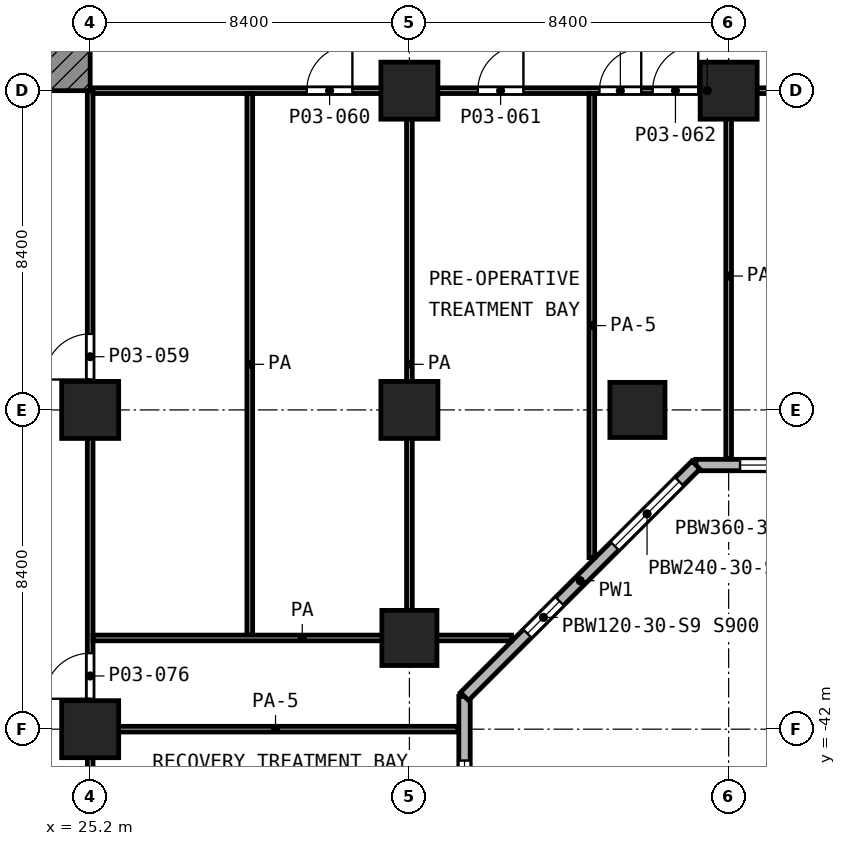
"""IFC4 building model, lengths in metres.
Left out: names, types, materials, properties, quantities, classifications, styles, units other than length and angle.
Written with IfcOpenShell. Run it as: python <this file> out.ifc"""

import sys

from ifc_helpers import new_model, si_unit, direction, frame, frame_2d, origin, origin_2d, place, context, subcontext, project, spatial, rectangle, extrude, element, fill, save


model = new_model("IFC4")
c1 = context("Model", 3, precision=1e-05, world=origin(), true_north=direction((0.0, 1.0)))
c2 = subcontext(c1, "Body", "Model", "MODEL_VIEW")
j1 = project(units=[si_unit("LENGTHUNIT", "METRE"), si_unit("PLANEANGLEUNIT", "RADIAN")], contexts=[c1])
p1 = place(None, origin())
s1 = spatial("IfcSite", under=j1, at=p1, CompositionType="ELEMENT")
p2 = place(p1, origin())
s2 = spatial("IfcBuilding", under=s1, at=p2, CompositionType="ELEMENT")
p3 = place(p2, frame((0.0, 0.0, 12.6)))
s3 = spatial("IfcBuildingStorey", under=s2, at=p3, CompositionType="ELEMENT", Elevation=12.6)
for number, where, z_axis, x_axis in (
    (1, (33.6, -25.2, 0.0), (0.0, 0.0, 1.0), (1.0, 0.0, 0.0)),
    (2, (42.0, -25.2, 0.0), (0.0, 0.0, 1.0), (1.0, 0.0, 0.0)),
    (3, (25.2, -33.6, 0.0), (0.0, 0.0, 1.0), (1.0, 0.0, 0.0)),
    (4, (33.6, -33.6, 0.0), (0.0, 0.0, 1.0), (1.0, 0.0, 0.0)),
):
    element("IfcColumn", number, at=place(p3, frame(where, z_axis=z_axis, x_axis=x_axis)), inside=s3, PredefinedType="COLUMN", context=c2, shape_type="SweptSolid", body=[
        extrude(rectangle(XDim=1.5, YDim=1.5, at=origin_2d()), origin(), (0.0, 0.0, 1.0), 5.6),
    ])
for number, where, z_axis, x_axis in (
    (5, (39.6, -33.6, 0.0), (0.0, 0.0, 1.0), (1.0, 0.0, 0.0)),
    (6, (33.6, -39.6, 0.0), (0.0, 0.0, 1.0), (1.0, 0.0, 0.0)),
):
    element("IfcColumn", number, at=place(p3, frame(where, z_axis=z_axis, x_axis=x_axis)), inside=s3, PredefinedType="COLUMN", context=c2, shape_type="SweptSolid", body=[
        extrude(rectangle(XDim=1.45, YDim=1.45, at=origin_2d()), origin(), (0.0, 0.0, 1.0), 5.6),
    ])
p4 = place(p3, frame((25.2, -42.0, 0.0), z_axis=(0.0, 0.0, 1.0), x_axis=(1.0, 0.0, 0.0)))
e7 = element("IfcColumn", 7, at=p4, inside=s3, PredefinedType="COLUMN", context=c2, shape_type="SweptSolid", body=[
    extrude(rectangle(XDim=1.5, YDim=1.5, at=origin_2d()), origin(), (0.0, 0.0, 1.0), 5.6),
])
p5 = place(p3, frame((35.05, -79.538, 0.0), z_axis=(0.0, 0.0, 1.0), x_axis=(0.0, 1.0, 0.0)))
e8 = element("IfcWall", 8, at=p5, inside=s3, PredefinedType="SOLIDWALL", context=c2, shape_type="SweptSolid", body=[
    extrude(rectangle(XDim=38.4, YDim=0.3, at=frame_2d((19.2, 0.0))), origin(), (0.0, 0.0, 1.0), 5.25),
])
p6 = place(p5, frame((0.738, 0.0, 0.9)))
e9 = element("IfcOpeningElement", 9, at=p6, cuts=e8, PredefinedType="OPENING", context=c2, shape_type="SweptSolid", body=[
    extrude(rectangle(XDim=2.4, YDim=3.0, at=frame_2d((1.2, 1.5))), frame((0.0, 0.16, 0.0), z_axis=(0.0, -1.0, 0.0), x_axis=(1.0, 0.0, 0.0)), (0.0, 0.0, 1.0), 0.32),
])
p7 = place(p5, frame((4.238, 0.0, 0.9)))
e10 = element("IfcOpeningElement", 10, at=p7, cuts=e8, PredefinedType="OPENING", context=c2, shape_type="SweptSolid", body=[
    extrude(rectangle(XDim=3.6, YDim=3.0, at=frame_2d((1.8, 1.5))), frame((0.0, 0.16, 0.0), z_axis=(0.0, -1.0, 0.0), x_axis=(1.0, 0.0, 0.0)), (0.0, 0.0, 1.0), 0.32),
])
p8 = place(p5, frame((8.438, 0.0, 0.9)))
e11 = element("IfcOpeningElement", 11, at=p8, cuts=e8, PredefinedType="OPENING", context=c2, shape_type="SweptSolid", body=[
    extrude(rectangle(XDim=3.6, YDim=3.0, at=frame_2d((1.8, 1.5))), frame((0.0, 0.16, 0.0), z_axis=(0.0, -1.0, 0.0), x_axis=(1.0, 0.0, 0.0)), (0.0, 0.0, 1.0), 0.32),
])
p9 = place(p5, frame((12.638, 0.0, 0.9)))
e12 = element("IfcOpeningElement", 12, at=p9, cuts=e8, PredefinedType="OPENING", context=c2, shape_type="SweptSolid", body=[
    extrude(rectangle(XDim=3.6, YDim=3.0, at=frame_2d((1.8, 1.5))), frame((0.0, 0.16, 0.0), z_axis=(0.0, -1.0, 0.0), x_axis=(1.0, 0.0, 0.0)), (0.0, 0.0, 1.0), 0.32),
])
p10 = place(p5, frame((17.663, 0.0, 0.9)))
e13 = element("IfcOpeningElement", 13, at=p10, cuts=e8, PredefinedType="OPENING", context=c2, shape_type="SweptSolid", body=[
    extrude(rectangle(XDim=2.4, YDim=3.0, at=frame_2d((1.2, 1.5))), frame((0.0, 0.16, 0.0), z_axis=(0.0, -1.0, 0.0), x_axis=(1.0, 0.0, 0.0)), (0.0, 0.0, 1.0), 0.32),
])
p11 = place(p5, frame((21.563, 0.0, 0.9)))
e14 = element("IfcOpeningElement", 14, at=p11, cuts=e8, PredefinedType="OPENING", context=c2, shape_type="SweptSolid", body=[
    extrude(rectangle(XDim=2.4, YDim=3.0, at=frame_2d((1.2, 1.5))), frame((0.0, 0.16, 0.0), z_axis=(0.0, -1.0, 0.0), x_axis=(1.0, 0.0, 0.0)), (0.0, 0.0, 1.0), 0.32),
])
p12 = place(p5, frame((25.238, 0.0, 0.9)))
e15 = element("IfcOpeningElement", 15, at=p12, cuts=e8, PredefinedType="OPENING", context=c2, shape_type="SweptSolid", body=[
    extrude(rectangle(XDim=3.6, YDim=3.0, at=frame_2d((1.8, 1.5))), frame((0.0, 0.16, 0.0), z_axis=(0.0, -1.0, 0.0), x_axis=(1.0, 0.0, 0.0)), (0.0, 0.0, 1.0), 0.32),
])
p13 = place(p5, frame((29.438, 0.0, 0.9)))
e16 = element("IfcOpeningElement", 16, at=p13, cuts=e8, PredefinedType="OPENING", context=c2, shape_type="SweptSolid", body=[
    extrude(rectangle(XDim=3.6, YDim=3.0, at=frame_2d((1.8, 1.5))), frame((0.0, 0.16, 0.0), z_axis=(0.0, -1.0, 0.0), x_axis=(1.0, 0.0, 0.0)), (0.0, 0.0, 1.0), 0.32),
])
p14 = place(p5, frame((34.313, 0.0, 0.9)))
e17 = element("IfcOpeningElement", 17, at=p14, cuts=e8, PredefinedType="OPENING", context=c2, shape_type="SweptSolid", body=[
    extrude(rectangle(XDim=2.4, YDim=3.0, at=frame_2d((1.2, 1.5))), frame((0.0, 0.16, 0.0), z_axis=(0.0, -1.0, 0.0), x_axis=(1.0, 0.0, 0.0)), (0.0, 0.0, 1.0), 0.32),
])
p15 = place(p3, frame((35.05, -41.138, 0.0), z_axis=(0.0, 0.0, 1.0), x_axis=(0.707106781187, 0.707106781187, 0.0)))
e18 = element("IfcWall", 18, at=p15, inside=s3, PredefinedType="SOLIDWALL", context=c2, shape_type="SweptSolid", body=[
    extrude(rectangle(XDim=8.61, YDim=0.3, at=frame_2d((4.305, 0.0))), origin(), (0.0, 0.0, 1.0), 5.25),
])
p16 = place(p15, frame((2.34, 0.0, 0.9)))
e19 = element("IfcOpeningElement", 19, at=p16, cuts=e18, PredefinedType="OPENING", context=c2, shape_type="SweptSolid", body=[
    extrude(rectangle(XDim=1.2, YDim=3.0, at=frame_2d((0.6, 1.5))), frame((0.0, 0.16, 0.0), z_axis=(0.0, -1.0, 0.0), x_axis=(1.0, 0.0, 0.0)), (0.0, 0.0, 1.0), 0.32),
])
p17 = place(p15, frame((5.593, 0.0, 0.9)))
e20 = element("IfcOpeningElement", 20, at=p17, cuts=e18, PredefinedType="OPENING", context=c2, shape_type="SweptSolid", body=[
    extrude(rectangle(XDim=2.4, YDim=3.0, at=frame_2d((1.2, 1.5))), frame((0.0, 0.16, 0.0), z_axis=(0.0, -1.0, 0.0), x_axis=(1.0, 0.0, 0.0)), (0.0, 0.0, 1.0), 0.32),
])
p18 = place(p3, frame((41.138, -35.05, 0.0), z_axis=(0.0, 0.0, 1.0), x_axis=(1.0, 0.0, 0.0)))
e21 = element("IfcWall", 21, at=p18, inside=s3, PredefinedType="SOLIDWALL", context=c2, shape_type="SweptSolid", body=[
    extrude(rectangle(XDim=18.712, YDim=0.3, at=frame_2d((9.356, 0.0))), origin(), (0.0, 0.0, 1.0), 5.25),
])
p19 = place(p18, frame((1.162, 0.0, 0.9)))
e22 = element("IfcOpeningElement", 22, at=p19, cuts=e21, PredefinedType="OPENING", context=c2, shape_type="SweptSolid", body=[
    extrude(rectangle(XDim=3.6, YDim=3.0, at=frame_2d((1.8, 1.5))), frame((0.0, 0.16, 0.0), z_axis=(0.0, -1.0, 0.0), x_axis=(1.0, 0.0, 0.0)), (0.0, 0.0, 1.0), 0.32),
])
p20 = place(p18, frame((5.362, 0.0, 0.9)))
e23 = element("IfcOpeningElement", 23, at=p20, cuts=e21, PredefinedType="OPENING", context=c2, shape_type="SweptSolid", body=[
    extrude(rectangle(XDim=3.6, YDim=3.0, at=frame_2d((1.8, 1.5))), frame((0.0, 0.16, 0.0), z_axis=(0.0, -1.0, 0.0), x_axis=(1.0, 0.0, 0.0)), (0.0, 0.0, 1.0), 0.32),
])
p21 = place(p18, frame((9.562, 0.0, 0.9)))
e24 = element("IfcOpeningElement", 24, at=p21, cuts=e21, PredefinedType="OPENING", context=c2, shape_type="SweptSolid", body=[
    extrude(rectangle(XDim=3.6, YDim=3.0, at=frame_2d((1.8, 1.5))), frame((0.0, 0.16, 0.0), z_axis=(0.0, -1.0, 0.0), x_axis=(1.0, 0.0, 0.0)), (0.0, 0.0, 1.0), 0.32),
])
p22 = place(p18, frame((14.437, 0.0, 0.9)))
e25 = element("IfcOpeningElement", 25, at=p22, cuts=e21, PredefinedType="OPENING", context=c2, shape_type="SweptSolid", body=[
    extrude(rectangle(XDim=2.4, YDim=3.0, at=frame_2d((1.2, 1.5))), frame((0.0, 0.16, 0.0), z_axis=(0.0, -1.0, 0.0), x_axis=(1.0, 0.0, 0.0)), (0.0, 0.0, 1.0), 0.32),
])
p23 = place(p3, frame((24.6, -25.2, 0.0), z_axis=(0.0, 0.0, 1.0), x_axis=(0.0, 1.0, 0.0)))
e26 = element("IfcWall", 26, at=p23, inside=s3, PredefinedType="SHEAR", context=c2, shape_type="SweptSolid", body=[
    extrude(rectangle(XDim=1.2, YDim=1.2, at=frame_2d((0.6, 0.0))), origin(), (0.0, 0.0, 1.0), 5.25),
])
p24 = place(p3, frame((25.275, -42.0, 0.0), z_axis=(0.0, 0.0, 1.0), x_axis=(1.0, 0.0, 0.0)))
e27 = element("IfcWall", 27, at=p24, inside=s3, PredefinedType="PARTITIONING", context=c2, shape_type="SweptSolid", body=[
    extrude(rectangle(XDim=9.605, YDim=0.15, at=frame_2d((4.802, 0.0))), origin(), (0.0, 0.0, 1.0), 3.85),
])
p25 = place(p3, frame((25.275, -39.6, 0.0), z_axis=(0.0, 0.0, 1.0), x_axis=(1.0, 0.0, 0.0)))
e28 = element("IfcWall", 28, at=p25, inside=s3, PredefinedType="PARTITIONING", context=c2, shape_type="SweptSolid", body=[
    extrude(rectangle(XDim=11.012, YDim=0.15, at=frame_2d((5.506, 0.0))), origin(), (0.0, 0.0, 1.0), 5.25),
])
p26 = place(p3, frame((25.275, -25.2, 0.0), z_axis=(0.0, 0.0, 1.0), x_axis=(1.0, 0.0, 0.0)))
e29 = element("IfcWall", 29, at=p26, inside=s3, PredefinedType="PARTITIONING", context=c2, shape_type="SweptSolid", body=[
    extrude(rectangle(XDim=32.325, YDim=0.15, at=frame_2d((16.163, 0.0))), origin(), (0.0, 0.0, 1.0), 5.25),
])
p27 = place(p26, frame((5.625, 0.0, 0.0)))
e30 = element("IfcOpeningElement", 30, at=p27, cuts=e29, PredefinedType="OPENING", context=c2, shape_type="SweptSolid", body=[
    extrude(rectangle(XDim=1.2, YDim=2.1, at=frame_2d((0.6, 1.05))), frame((0.0, 0.085, 0.0), z_axis=(0.0, -1.0, 0.0), x_axis=(1.0, 0.0, 0.0)), (0.0, 0.0, 1.0), 0.17),
])
p28 = place(p26, frame((10.125, 0.0, 0.0)))
e31 = element("IfcOpeningElement", 31, at=p28, cuts=e29, PredefinedType="OPENING", context=c2, shape_type="SweptSolid", body=[
    extrude(rectangle(XDim=1.2, YDim=2.1, at=frame_2d((0.6, 1.05))), frame((0.0, 0.085, 0.0), z_axis=(0.0, -1.0, 0.0), x_axis=(1.0, 0.0, 0.0)), (0.0, 0.0, 1.0), 0.17),
])
p29 = place(p26, frame((14.725, 0.0, 0.0)))
e32 = element("IfcOpeningElement", 32, at=p29, cuts=e29, PredefinedType="OPENING", context=c2, shape_type="SweptSolid", body=[
    extrude(rectangle(XDim=1.2, YDim=2.1, at=frame_2d((0.6, 1.05))), frame((0.0, 0.085, 0.0), z_axis=(0.0, -1.0, 0.0), x_axis=(1.0, 0.0, 0.0)), (0.0, 0.0, 1.0), 0.17),
])
p30 = place(p26, frame((13.325, 0.0, 0.0)))
e33 = element("IfcOpeningElement", 33, at=p30, cuts=e29, PredefinedType="OPENING", context=c2, shape_type="SweptSolid", body=[
    extrude(rectangle(XDim=1.1, YDim=2.1, at=frame_2d((0.55, 1.05))), frame((0.0, 0.085, 0.0), z_axis=(0.0, -1.0, 0.0), x_axis=(1.0, 0.0, 0.0)), (0.0, 0.0, 1.0), 0.17),
])
p31 = place(p26, frame((22.275, 0.0, 0.0)))
e34 = element("IfcOpeningElement", 34, at=p31, cuts=e29, PredefinedType="OPENING", context=c2, shape_type="SweptSolid", body=[
    extrude(rectangle(XDim=1.5, YDim=2.1, at=frame_2d((0.75, 1.05))), frame((0.0, 0.085, 0.0), z_axis=(0.0, -1.0, 0.0), x_axis=(1.0, 0.0, 0.0)), (0.0, 0.0, 1.0), 0.17),
])
p32 = place(p26, frame((20.175, 0.0, 0.0)))
e35 = element("IfcOpeningElement", 35, at=p32, cuts=e29, PredefinedType="OPENING", context=c2, shape_type="SweptSolid", body=[
    extrude(rectangle(XDim=1.5, YDim=2.1, at=frame_2d((0.75, 1.05))), frame((0.0, 0.085, 0.0), z_axis=(0.0, -1.0, 0.0), x_axis=(1.0, 0.0, 0.0)), (0.0, 0.0, 1.0), 0.17),
])
p33 = place(p26, frame((18.075, 0.0, 0.0)))
e36 = element("IfcOpeningElement", 36, at=p33, cuts=e29, PredefinedType="OPENING", context=c2, shape_type="SweptSolid", body=[
    extrude(rectangle(XDim=1.5, YDim=2.1, at=frame_2d((0.75, 1.05))), frame((0.0, 0.085, 0.0), z_axis=(0.0, -1.0, 0.0), x_axis=(1.0, 0.0, 0.0)), (0.0, 0.0, 1.0), 0.17),
])
p34 = place(p26, frame((27.525, 0.0, 0.0)))
e37 = element("IfcOpeningElement", 37, at=p34, cuts=e29, PredefinedType="OPENING", context=c2, shape_type="SweptSolid", body=[
    extrude(rectangle(XDim=1.2, YDim=2.1, at=frame_2d((0.6, 1.05))), frame((0.0, 0.085, 0.0), z_axis=(0.0, -1.0, 0.0), x_axis=(1.0, 0.0, 0.0)), (0.0, 0.0, 1.0), 0.17),
])
p35 = place(p26, frame((26.025, 0.0, 0.0)))
e38 = element("IfcOpeningElement", 38, at=p35, cuts=e29, PredefinedType="OPENING", context=c2, shape_type="SweptSolid", body=[
    extrude(rectangle(XDim=1.2, YDim=2.1, at=frame_2d((0.6, 1.05))), frame((0.0, 0.085, 0.0), z_axis=(0.0, -1.0, 0.0), x_axis=(1.0, 0.0, 0.0)), (0.0, 0.0, 1.0), 0.17),
])
p36 = place(p26, frame((30.825, 0.0, 0.0)))
e39 = element("IfcOpeningElement", 39, at=p36, cuts=e29, PredefinedType="OPENING", context=c2, shape_type="SweptSolid", body=[
    extrude(rectangle(XDim=1.2, YDim=2.1, at=frame_2d((0.6, 1.05))), frame((0.0, 0.085, 0.0), z_axis=(0.0, -1.0, 0.0), x_axis=(1.0, 0.0, 0.0)), (0.0, 0.0, 1.0), 0.17),
])
p37 = place(p3, frame((25.2, -81.3, 0.0), z_axis=(0.0, 0.0, 1.0), x_axis=(0.0, 1.0, 0.0)))
e40 = element("IfcWall", 40, at=p37, inside=s3, PredefinedType="PARTITIONING", context=c2, shape_type="SweptSolid", body=[
    extrude(rectangle(XDim=56.1, YDim=0.15, at=frame_2d((28.05, 0.0))), origin(), (0.0, 0.0, 1.0), 5.25),
])
p38 = place(p37, frame((48.5, 0.0, 0.0)))
e41 = element("IfcOpeningElement", 41, at=p38, cuts=e40, PredefinedType="OPENING", context=c2, shape_type="SweptSolid", body=[
    extrude(rectangle(XDim=1.2, YDim=2.1, at=frame_2d((0.6, 1.05))), frame((0.0, 0.085, 0.0), z_axis=(0.0, -1.0, 0.0), x_axis=(1.0, 0.0, 0.0)), (0.0, 0.0, 1.0), 0.17),
])
p39 = place(p37, frame((40.1, 0.0, 0.0)))
e42 = element("IfcOpeningElement", 42, at=p39, cuts=e40, PredefinedType="OPENING", context=c2, shape_type="SweptSolid", body=[
    extrude(rectangle(XDim=1.2, YDim=2.1, at=frame_2d((0.6, 1.05))), frame((0.0, 0.085, 0.0), z_axis=(0.0, -1.0, 0.0), x_axis=(1.0, 0.0, 0.0)), (0.0, 0.0, 1.0), 0.17),
])
p40 = place(p37, frame((36.75, 0.0, 0.0)))
e43 = element("IfcOpeningElement", 43, at=p40, cuts=e40, PredefinedType="OPENING", context=c2, shape_type="SweptSolid", body=[
    extrude(rectangle(XDim=1.2, YDim=2.1, at=frame_2d((0.6, 1.05))), frame((0.0, 0.085, 0.0), z_axis=(0.0, -1.0, 0.0), x_axis=(1.0, 0.0, 0.0)), (0.0, 0.0, 1.0), 0.17),
])
p41 = place(p37, frame((32.55, 0.0, 0.0)))
e44 = element("IfcOpeningElement", 44, at=p41, cuts=e40, PredefinedType="OPENING", context=c2, shape_type="SweptSolid", body=[
    extrude(rectangle(XDim=1.2, YDim=2.1, at=frame_2d((0.6, 1.05))), frame((0.0, 0.085, 0.0), z_axis=(0.0, -1.0, 0.0), x_axis=(1.0, 0.0, 0.0)), (0.0, 0.0, 1.0), 0.17),
])
p42 = place(p37, frame((28.05, 0.0, 0.0)))
e45 = element("IfcOpeningElement", 45, at=p42, cuts=e40, PredefinedType="OPENING", context=c2, shape_type="SweptSolid", body=[
    extrude(rectangle(XDim=1.2, YDim=2.1, at=frame_2d((0.6, 1.05))), frame((0.0, 0.085, 0.0), z_axis=(0.0, -1.0, 0.0), x_axis=(1.0, 0.0, 0.0)), (0.0, 0.0, 1.0), 0.17),
])
p43 = place(p37, frame((23.85, 0.0, 0.0)))
e46 = element("IfcOpeningElement", 46, at=p43, cuts=e40, PredefinedType="OPENING", context=c2, shape_type="SweptSolid", body=[
    extrude(rectangle(XDim=1.2, YDim=2.1, at=frame_2d((0.6, 1.05))), frame((0.0, 0.085, 0.0), z_axis=(0.0, -1.0, 0.0), x_axis=(1.0, 0.0, 0.0)), (0.0, 0.0, 1.0), 0.17),
])
p44 = place(p37, frame((20.1, 0.0, 0.0)))
e47 = element("IfcOpeningElement", 47, at=p44, cuts=e40, PredefinedType="OPENING", context=c2, shape_type="SweptSolid", body=[
    extrude(rectangle(XDim=1.2, YDim=2.1, at=frame_2d((0.6, 1.05))), frame((0.0, 0.085, 0.0), z_axis=(0.0, -1.0, 0.0), x_axis=(1.0, 0.0, 0.0)), (0.0, 0.0, 1.0), 0.17),
])
p45 = place(p37, frame((15.9, 0.0, 0.0)))
e48 = element("IfcOpeningElement", 48, at=p45, cuts=e40, PredefinedType="OPENING", context=c2, shape_type="SweptSolid", body=[
    extrude(rectangle(XDim=1.2, YDim=2.1, at=frame_2d((0.6, 1.05))), frame((0.0, 0.085, 0.0), z_axis=(0.0, -1.0, 0.0), x_axis=(1.0, 0.0, 0.0)), (0.0, 0.0, 1.0), 0.17),
])
p46 = place(p37, frame((11.4, 0.0, 0.0)))
e49 = element("IfcOpeningElement", 49, at=p46, cuts=e40, PredefinedType="OPENING", context=c2, shape_type="SweptSolid", body=[
    extrude(rectangle(XDim=1.2, YDim=2.1, at=frame_2d((0.6, 1.05))), frame((0.0, 0.085, 0.0), z_axis=(0.0, -1.0, 0.0), x_axis=(1.0, 0.0, 0.0)), (0.0, 0.0, 1.0), 0.17),
])
p47 = place(p37, frame((7.2, 0.0, 0.0)))
e50 = element("IfcOpeningElement", 50, at=p47, cuts=e40, PredefinedType="OPENING", context=c2, shape_type="SweptSolid", body=[
    extrude(rectangle(XDim=1.2, YDim=2.1, at=frame_2d((0.6, 1.05))), frame((0.0, 0.085, 0.0), z_axis=(0.0, -1.0, 0.0), x_axis=(1.0, 0.0, 0.0)), (0.0, 0.0, 1.0), 0.17),
])
p48 = place(p37, frame((2.7, 0.0, 0.0)))
e51 = element("IfcOpeningElement", 51, at=p48, cuts=e40, PredefinedType="OPENING", context=c2, shape_type="SweptSolid", body=[
    extrude(rectangle(XDim=1.2, YDim=2.1, at=frame_2d((0.6, 1.05))), frame((0.0, 0.085, 0.0), z_axis=(0.0, -1.0, 0.0), x_axis=(1.0, 0.0, 0.0)), (0.0, 0.0, 1.0), 0.17),
])
for number, where, z_axis, x_axis in (
    (52, (29.4, -39.525, 0.0), (0.0, 0.0, 1.0), (0.0, 1.0, 0.0)),
    (53, (33.6, -39.525, 0.0), (0.0, 0.0, 1.0), (0.0, 1.0, 0.0)),
):
    element("IfcWall", number, at=place(p3, frame(where, z_axis=z_axis, x_axis=x_axis)), inside=s3, PredefinedType="PARTITIONING", context=c2, shape_type="SweptSolid", body=[
        extrude(rectangle(XDim=14.25, YDim=0.15, at=frame_2d((7.125, 0.0))), origin(), (0.0, 0.0, 1.0), 5.25),
    ])
p49 = place(p3, frame((38.4, -37.487, 0.0), z_axis=(0.0, 0.0, 1.0), x_axis=(0.0, 1.0, 0.0)))
e54 = element("IfcWall", 54, at=p49, inside=s3, PredefinedType="PARTITIONING", context=c2, shape_type="SweptSolid", body=[
    extrude(rectangle(XDim=12.212, YDim=0.15, at=frame_2d((6.106, 0.0))), origin(), (0.0, 0.0, 1.0), 3.85),
])
p50 = place(p3, frame((42.0, -34.88, 0.0), z_axis=(0.0, 0.0, 1.0), x_axis=(0.0, 1.0, 0.0)))
e55 = element("IfcWall", 55, at=p50, inside=s3, PredefinedType="PARTITIONING", context=c2, shape_type="SweptSolid", body=[
    extrude(rectangle(XDim=9.605, YDim=0.15, at=frame_2d((4.802, 0.0))), origin(), (0.0, 0.0, 1.0), 3.85),
])
p51 = place(p14, origin())
e56 = element("IfcWindow", 56, at=p51, inside=s3, PartitioningType="SINGLE_PANEL", PredefinedType="WINDOW", context=c2, shape_type="SweptSolid", body=[
    extrude(rectangle(XDim=2.4, YDim=3.0, at=frame_2d((1.2, 1.5))), frame((0.0, 0.03, 0.0), z_axis=(0.0, -1.0, 0.0), x_axis=(1.0, 0.0, 0.0)), (0.0, 0.0, 1.0), 0.06),
])
fill(e17, e56)
p52 = place(p16, origin())
e57 = element("IfcWindow", 57, at=p52, inside=s3, PartitioningType="SINGLE_PANEL", PredefinedType="WINDOW", context=c2, shape_type="SweptSolid", body=[
    extrude(rectangle(XDim=1.2, YDim=3.0, at=frame_2d((0.6, 1.5))), frame((0.0, 0.03, 0.0), z_axis=(0.0, -1.0, 0.0), x_axis=(1.0, 0.0, 0.0)), (0.0, 0.0, 1.0), 0.06),
])
fill(e19, e57)
p53 = place(p17, origin())
e58 = element("IfcWindow", 58, at=p53, inside=s3, PartitioningType="SINGLE_PANEL", PredefinedType="WINDOW", context=c2, shape_type="SweptSolid", body=[
    extrude(rectangle(XDim=2.4, YDim=3.0, at=frame_2d((1.2, 1.5))), frame((0.0, 0.03, 0.0), z_axis=(0.0, -1.0, 0.0), x_axis=(1.0, 0.0, 0.0)), (0.0, 0.0, 1.0), 0.06),
])
fill(e20, e58)
p54 = place(p19, origin())
e59 = element("IfcWindow", 59, at=p54, inside=s3, PartitioningType="SINGLE_PANEL", PredefinedType="WINDOW", context=c2, shape_type="SweptSolid", body=[
    extrude(rectangle(XDim=3.6, YDim=3.0, at=frame_2d((1.8, 1.5))), frame((0.0, 0.03, 0.0), z_axis=(0.0, -1.0, 0.0), x_axis=(1.0, 0.0, 0.0)), (0.0, 0.0, 1.0), 0.06),
])
fill(e22, e59)
p55 = place(p38, origin())
e60 = element("IfcDoor", 60, at=p55, inside=s3, OperationType="SINGLE_SWING_LEFT", PredefinedType="DOOR", context=c2, shape_type="SweptSolid", body=[
    extrude(rectangle(XDim=1.2, YDim=2.1, at=frame_2d((0.6, 1.05))), frame((0.0, 0.025, 0.0), z_axis=(0.0, -1.0, 0.0), x_axis=(1.0, 0.0, 0.0)), (0.0, 0.0, 1.0), 0.05),
])
fill(e41, e60)
p56 = place(p27, origin())
e61 = element("IfcDoor", 61, at=p56, inside=s3, OperationType="SINGLE_SWING_RIGHT", PredefinedType="DOOR", context=c2, shape_type="SweptSolid", body=[
    extrude(rectangle(XDim=1.2, YDim=2.1, at=frame_2d((0.6, 1.05))), frame((0.0, 0.025, 0.0), z_axis=(0.0, -1.0, 0.0), x_axis=(1.0, 0.0, 0.0)), (0.0, 0.0, 1.0), 0.05),
])
fill(e30, e61)
p57 = place(p28, origin())
e62 = element("IfcDoor", 62, at=p57, inside=s3, OperationType="SINGLE_SWING_RIGHT", PredefinedType="DOOR", context=c2, shape_type="SweptSolid", body=[
    extrude(rectangle(XDim=1.2, YDim=2.1, at=frame_2d((0.6, 1.05))), frame((0.0, 0.025, 0.0), z_axis=(0.0, -1.0, 0.0), x_axis=(1.0, 0.0, 0.0)), (0.0, 0.0, 1.0), 0.05),
])
fill(e31, e62)
p58 = place(p29, origin())
e63 = element("IfcDoor", 63, at=p58, inside=s3, OperationType="SINGLE_SWING_RIGHT", PredefinedType="DOOR", context=c2, shape_type="SweptSolid", body=[
    extrude(rectangle(XDim=1.2, YDim=2.1, at=frame_2d((0.6, 1.05))), frame((0.0, 0.025, 0.0), z_axis=(0.0, -1.0, 0.0), x_axis=(1.0, 0.0, 0.0)), (0.0, 0.0, 1.0), 0.05),
])
fill(e32, e63)
p59 = place(p30, origin())
e64 = element("IfcDoor", 64, at=p59, inside=s3, OperationType="SINGLE_SWING_RIGHT", PredefinedType="DOOR", context=c2, shape_type="SweptSolid", body=[
    extrude(rectangle(XDim=1.1, YDim=2.1, at=frame_2d((0.55, 1.05))), frame((0.0, 0.025, 0.0), z_axis=(0.0, -1.0, 0.0), x_axis=(1.0, 0.0, 0.0)), (0.0, 0.0, 1.0), 0.05),
])
fill(e33, e64)
p60 = place(p39, origin())
e65 = element("IfcDoor", 65, at=p60, inside=s3, OperationType="SINGLE_SWING_LEFT", PredefinedType="DOOR", context=c2, shape_type="SweptSolid", body=[
    extrude(rectangle(XDim=1.2, YDim=2.1, at=frame_2d((0.6, 1.05))), frame((0.0, 0.025, 0.0), z_axis=(0.0, -1.0, 0.0), x_axis=(1.0, 0.0, 0.0)), (0.0, 0.0, 1.0), 0.05),
])
fill(e42, e65)
save(model, sys.argv[1])
